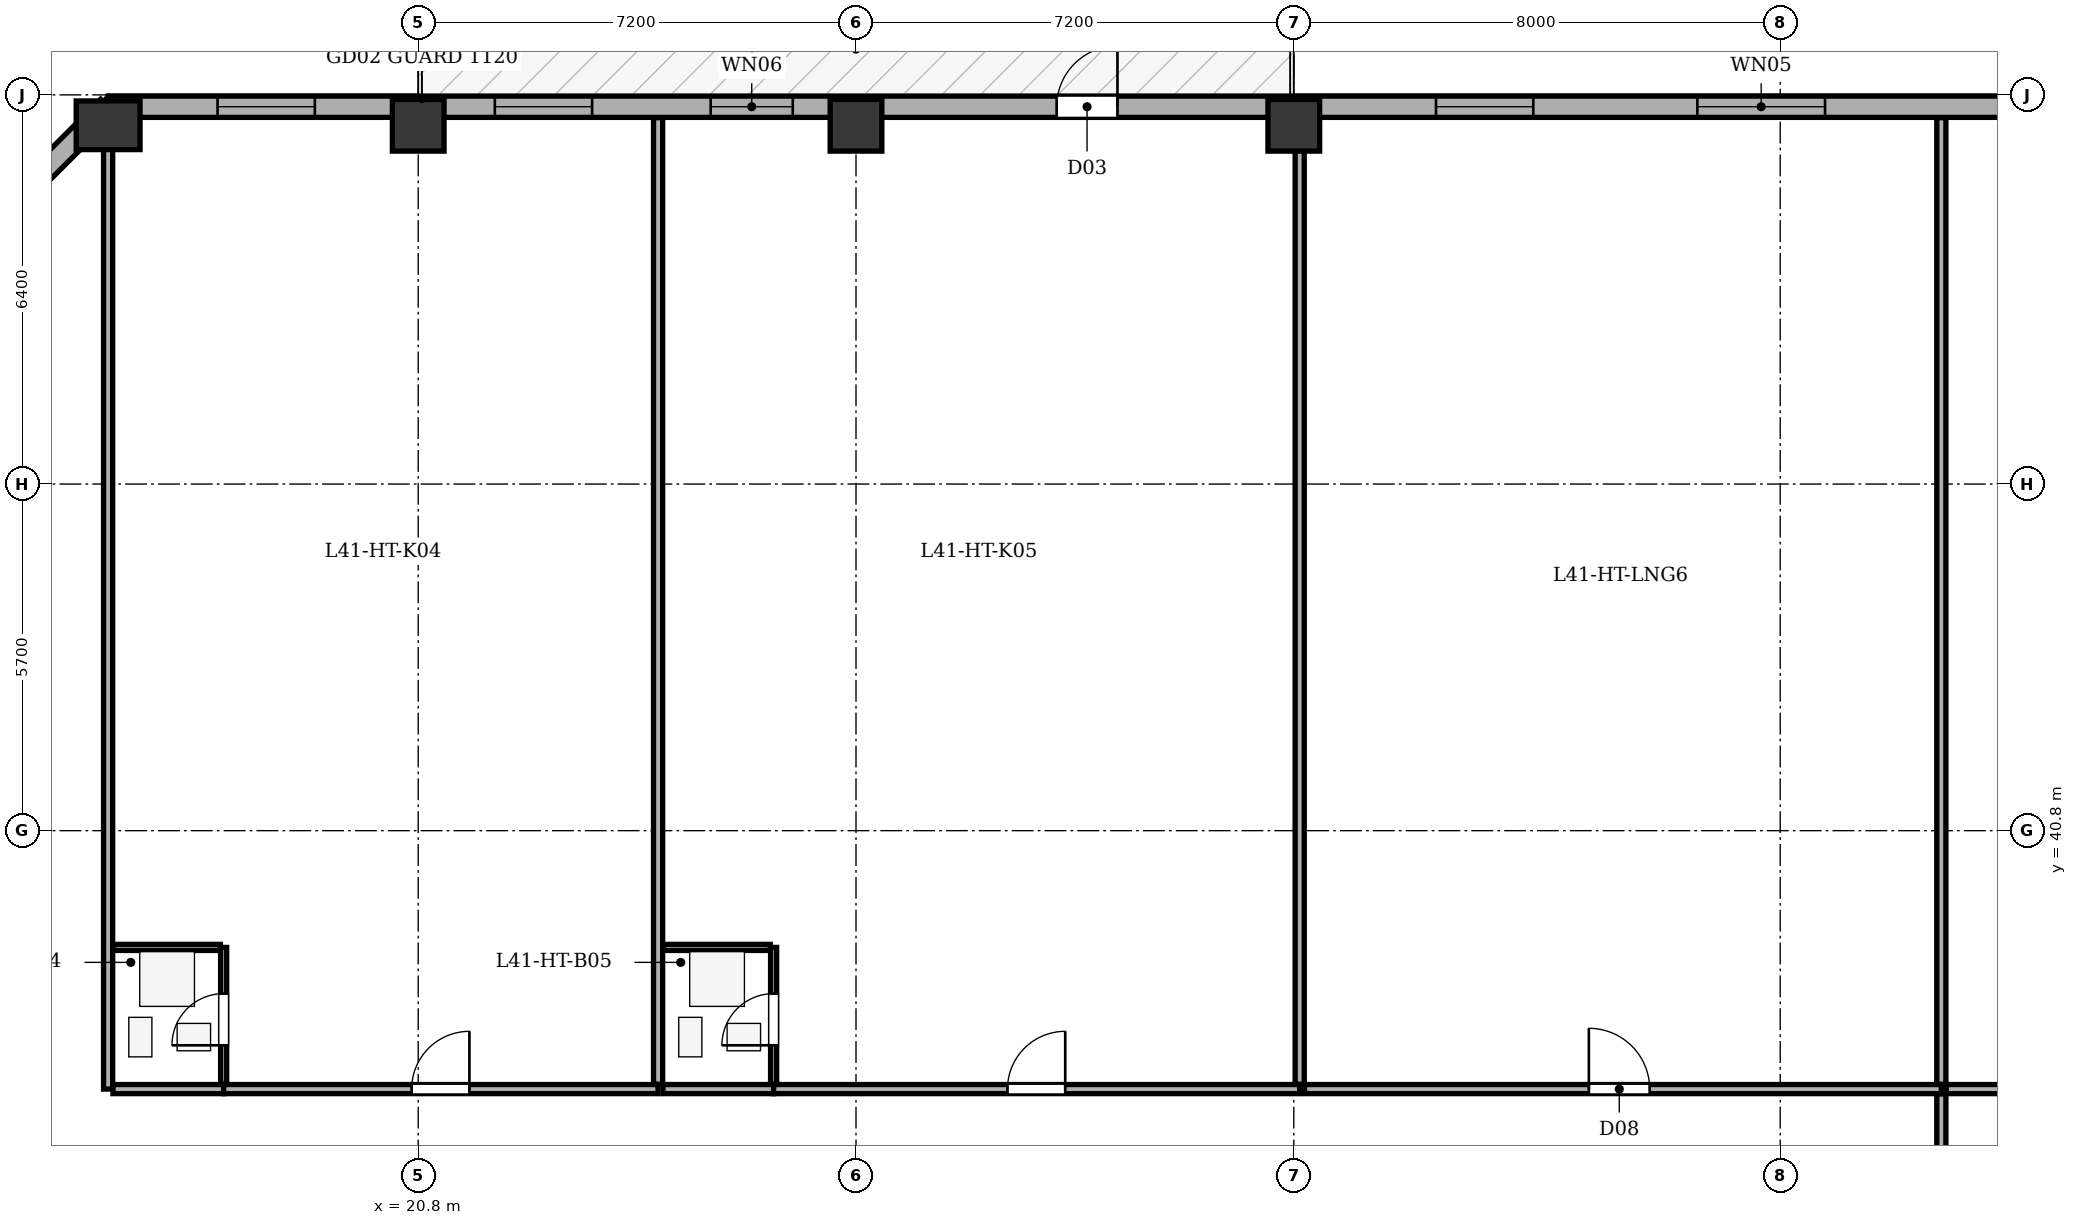
"""IFC4 building model, lengths in metres.
Left out: names, types, materials, properties, quantities, classifications, styles, units other than length and angle.
Written with IfcOpenShell. Run it as: python <this file> out.ifc"""

import sys

from ifc_helpers import new_model, si_unit, direction, frame, frame_2d, origin, origin_2d, place, context, subcontext, project, spatial, rectangle, extrude, element, fill, save


model = new_model("IFC4")
c1 = context("Model", 3, precision=1e-05, world=origin(), true_north=direction((0.0, 1.0)))
c2 = subcontext(c1, "Body", "Model", "MODEL_VIEW")
j1 = project(units=[si_unit("LENGTHUNIT", "METRE"), si_unit("PLANEANGLEUNIT", "RADIAN")], contexts=[c1])
p1 = place(None, origin())
s1 = spatial("IfcSite", under=j1, at=p1, CompositionType="ELEMENT")
p2 = place(p1, origin())
s2 = spatial("IfcBuilding", under=s1, at=p2, CompositionType="ELEMENT")
p3 = place(p2, frame((0.0, 0.0, 162.3)))
s3 = spatial("IfcBuildingStorey", under=s2, at=p3, CompositionType="ELEMENT", Elevation=162.3)
p4 = place(p3, frame((15.7, 52.4, 0.0), z_axis=(0.0, 0.0, 1.0), x_axis=(1.0, 0.0, 0.0)))
e1 = element("IfcColumn", 1, at=p4, inside=s3, PredefinedType="COLUMN", context=c2, shape_type="SweptSolid", body=[
    extrude(rectangle(XDim=0.8, YDim=1.05, at=origin_2d()), origin(), (0.0, 0.0, 1.0), 3.5),
])
for number, where, z_axis, x_axis in (
    (2, (20.8, 52.4, 0.0), (0.0, 0.0, 1.0), (1.0, 0.0, 0.0)),
    (3, (28.0, 52.4, 0.0), (0.0, 0.0, 1.0), (1.0, 0.0, 0.0)),
    (4, (35.2, 52.4, 0.0), (0.0, 0.0, 1.0), (1.0, 0.0, 0.0)),
):
    element("IfcColumn", number, at=place(p3, frame(where, z_axis=z_axis, x_axis=x_axis)), inside=s3, PredefinedType="COLUMN", context=c2, shape_type="SweptSolid", body=[
        extrude(rectangle(XDim=0.85, YDim=0.85, at=origin_2d()), origin(), (0.0, 0.0, 1.0), 3.5),
    ])
p5 = place(p3, frame((10.895, 47.9, 0.0), z_axis=(0.0, 0.0, 1.0), x_axis=(0.707088817216, 0.7071247447, 0.0)))
e5 = element("IfcWall", 5, at=p5, inside=s3, PredefinedType="STANDARD", context=c2, shape_type="SweptSolid", body=[
    extrude(rectangle(XDim=6.795, YDim=0.35, at=frame_2d((3.398, 0.0))), origin(), (0.0, 0.0, 1.0), 2.785),
])
p6 = place(p5, frame((2.698, 0.0, 0.75)))
e6 = element("IfcOpeningElement", 6, at=p6, cuts=e5, PredefinedType="OPENING", context=c2, shape_type="SweptSolid", body=[
    extrude(rectangle(XDim=1.4, YDim=1.65, at=frame_2d((0.7, 0.825))), frame((0.0, 0.185, 0.0), z_axis=(0.0, -1.0, 0.0), x_axis=(1.0, 0.0, 0.0)), (0.0, 0.0, 1.0), 0.37),
])
p7 = place(p3, frame((15.7, 52.705, 0.0), z_axis=(0.0, 0.0, 1.0), x_axis=(1.0, 0.0, 0.0)))
e7 = element("IfcWall", 7, at=p7, inside=s3, PredefinedType="STANDARD", context=c2, shape_type="SweptSolid", body=[
    extrude(rectangle(XDim=35.0, YDim=0.35, at=frame_2d((17.5, 0.0))), origin(), (0.0, 0.0, 1.0), 2.785),
])
p8 = place(p7, frame((15.6, 0.0, 0.0)))
e8 = element("IfcOpeningElement", 8, at=p8, cuts=e7, PredefinedType="OPENING", context=c2, shape_type="SweptSolid", body=[
    extrude(rectangle(XDim=1.0, YDim=2.02, at=frame_2d((0.5, 1.01))), frame((0.0, 0.185, 0.0), z_axis=(0.0, -1.0, 0.0), x_axis=(1.0, 0.0, 0.0)), (0.0, 0.0, 1.0), 0.37),
])
p9 = place(p7, frame((1.8, 0.0, 0.75)))
e9 = element("IfcOpeningElement", 9, at=p9, cuts=e7, PredefinedType="OPENING", context=c2, shape_type="SweptSolid", body=[
    extrude(rectangle(XDim=1.6, YDim=1.75, at=frame_2d((0.8, 0.875))), frame((0.0, 0.185, 0.0), z_axis=(0.0, -1.0, 0.0), x_axis=(1.0, 0.0, 0.0)), (0.0, 0.0, 1.0), 0.37),
])
p10 = place(p7, frame((6.36, 0.0, 0.75)))
e10 = element("IfcOpeningElement", 10, at=p10, cuts=e7, PredefinedType="OPENING", context=c2, shape_type="SweptSolid", body=[
    extrude(rectangle(XDim=1.6, YDim=1.75, at=frame_2d((0.8, 0.875))), frame((0.0, 0.185, 0.0), z_axis=(0.0, -1.0, 0.0), x_axis=(1.0, 0.0, 0.0)), (0.0, 0.0, 1.0), 0.37),
])
p11 = place(p7, frame((9.91, 0.0, 0.75)))
e11 = element("IfcOpeningElement", 11, at=p11, cuts=e7, PredefinedType="OPENING", context=c2, shape_type="SweptSolid", body=[
    extrude(rectangle(XDim=1.35, YDim=1.75, at=frame_2d((0.675, 0.875))), frame((0.0, 0.185, 0.0), z_axis=(0.0, -1.0, 0.0), x_axis=(1.0, 0.0, 0.0)), (0.0, 0.0, 1.0), 0.37),
])
p12 = place(p7, frame((21.839, 0.0, 0.75)))
e12 = element("IfcOpeningElement", 12, at=p12, cuts=e7, PredefinedType="OPENING", context=c2, shape_type="SweptSolid", body=[
    extrude(rectangle(XDim=1.6, YDim=1.75, at=frame_2d((0.8, 0.875))), frame((0.0, 0.185, 0.0), z_axis=(0.0, -1.0, 0.0), x_axis=(1.0, 0.0, 0.0)), (0.0, 0.0, 1.0), 0.37),
])
p13 = place(p7, frame((26.137, 0.0, 0.75)))
e13 = element("IfcOpeningElement", 13, at=p13, cuts=e7, PredefinedType="OPENING", context=c2, shape_type="SweptSolid", body=[
    extrude(rectangle(XDim=2.1, YDim=1.75, at=frame_2d((1.05, 0.875))), frame((0.0, 0.185, 0.0), z_axis=(0.0, -1.0, 0.0), x_axis=(1.0, 0.0, 0.0)), (0.0, 0.0, 1.0), 0.37),
])
p14 = place(p7, frame((31.637, 0.0, 0.75)))
e14 = element("IfcOpeningElement", 14, at=p14, cuts=e7, PredefinedType="OPENING", context=c2, shape_type="SweptSolid", body=[
    extrude(rectangle(XDim=1.6, YDim=1.75, at=frame_2d((0.8, 0.875))), frame((0.0, 0.185, 0.0), z_axis=(0.0, -1.0, 0.0), x_axis=(1.0, 0.0, 0.0)), (0.0, 0.0, 1.0), 0.37),
])
p15 = place(p3, frame((15.7, 36.55, 0.0), z_axis=(0.0, 0.0, 1.0), x_axis=(0.0, 1.0, 0.0)))
e15 = element("IfcWall", 15, at=p15, inside=s3, PredefinedType="PARTITIONING", context=c2, shape_type="SweptSolid", body=[
    extrude(rectangle(XDim=15.975, YDim=0.15, at=frame_2d((7.987, 0.0))), origin(), (0.0, 0.0, 1.0), 3.2),
])
p16 = place(p3, frame((15.78, 36.55, 0.0), z_axis=(0.0, 0.0, 1.0), x_axis=(1.0, 0.0, 0.0)))
e16 = element("IfcWall", 16, at=p16, inside=s3, PredefinedType="PARTITIONING", context=c2, shape_type="SweptSolid", body=[
    extrude(rectangle(XDim=1.82, YDim=0.15, at=frame_2d((0.91, 0.0))), origin(), (0.0, 0.0, 1.0), 3.2),
])
p17 = place(p3, frame((17.6, 36.55, 0.0), z_axis=(0.0, 0.0, 1.0), x_axis=(1.0, 0.0, 0.0)))
e17 = element("IfcWall", 17, at=p17, inside=s3, PredefinedType="PARTITIONING", context=c2, shape_type="SweptSolid", body=[
    extrude(rectangle(XDim=7.145, YDim=0.15, at=frame_2d((3.573, 0.0))), origin(), (0.0, 0.0, 1.0), 3.2),
])
p18 = place(p17, frame((3.092, 0.0, 0.0)))
e18 = element("IfcOpeningElement", 18, at=p18, cuts=e17, PredefinedType="OPENING", context=c2, shape_type="SweptSolid", body=[
    extrude(rectangle(XDim=0.95, YDim=2.1, at=frame_2d((0.475, 1.05))), frame((0.0, 0.085, 0.0), z_axis=(0.0, -1.0, 0.0), x_axis=(1.0, 0.0, 0.0)), (0.0, 0.0, 1.0), 0.17),
])
p19 = place(p3, frame((17.6, 36.63, 0.0), z_axis=(0.0, 0.0, 1.0), x_axis=(0.0, 1.0, 0.0)))
e19 = element("IfcWall", 19, at=p19, inside=s3, PredefinedType="PARTITIONING", context=c2, shape_type="SweptSolid", body=[
    extrude(rectangle(XDim=2.25, YDim=0.1, at=frame_2d((1.125, 0.0))), origin(), (0.0, 0.0, 1.0), 3.2),
])
p20 = place(p19, frame((0.64, 0.0, 0.0)))
e20 = element("IfcOpeningElement", 20, at=p20, cuts=e19, PredefinedType="OPENING", context=c2, shape_type="SweptSolid", body=[
    extrude(rectangle(XDim=0.85, YDim=2.05, at=frame_2d((0.425, 1.025))), frame((0.0, 0.06, 0.0), z_axis=(0.0, -1.0, 0.0), x_axis=(1.0, 0.0, 0.0)), (0.0, 0.0, 1.0), 0.12),
])
p21 = place(p3, frame((15.78, 38.88, 0.0), z_axis=(0.0, 0.0, 1.0), x_axis=(1.0, 0.0, 0.0)))
e21 = element("IfcWall", 21, at=p21, inside=s3, PredefinedType="PARTITIONING", context=c2, shape_type="SweptSolid", body=[
    extrude(rectangle(XDim=1.765, YDim=0.1, at=frame_2d((0.882, 0.0))), origin(), (0.0, 0.0, 1.0), 3.2),
])
p22 = place(p3, frame((24.745, 36.63, 0.0), z_axis=(0.0, 0.0, 1.0), x_axis=(0.0, 1.0, 0.0)))
e22 = element("IfcWall", 22, at=p22, inside=s3, PredefinedType="PARTITIONING", context=c2, shape_type="SweptSolid", body=[
    extrude(rectangle(XDim=15.895, YDim=0.15, at=frame_2d((7.948, 0.0))), origin(), (0.0, 0.0, 1.0), 3.2),
])
p23 = place(p3, frame((24.825, 36.55, 0.0), z_axis=(0.0, 0.0, 1.0), x_axis=(1.0, 0.0, 0.0)))
e23 = element("IfcWall", 23, at=p23, inside=s3, PredefinedType="PARTITIONING", context=c2, shape_type="SweptSolid", body=[
    extrude(rectangle(XDim=1.82, YDim=0.15, at=frame_2d((0.91, 0.0))), origin(), (0.0, 0.0, 1.0), 3.2),
])
p24 = place(p3, frame((26.645, 36.55, 0.0), z_axis=(0.0, 0.0, 1.0), x_axis=(1.0, 0.0, 0.0)))
e24 = element("IfcWall", 24, at=p24, inside=s3, PredefinedType="PARTITIONING", context=c2, shape_type="SweptSolid", body=[
    extrude(rectangle(XDim=8.652, YDim=0.15, at=frame_2d((4.326, 0.0))), origin(), (0.0, 0.0, 1.0), 3.2),
])
p25 = place(p24, frame((3.846, 0.0, 0.0)))
e25 = element("IfcOpeningElement", 25, at=p25, cuts=e24, PredefinedType="OPENING", context=c2, shape_type="SweptSolid", body=[
    extrude(rectangle(XDim=0.95, YDim=2.1, at=frame_2d((0.475, 1.05))), frame((0.0, 0.085, 0.0), z_axis=(0.0, -1.0, 0.0), x_axis=(1.0, 0.0, 0.0)), (0.0, 0.0, 1.0), 0.17),
])
p26 = place(p3, frame((26.645, 36.63, 0.0), z_axis=(0.0, 0.0, 1.0), x_axis=(0.0, 1.0, 0.0)))
e26 = element("IfcWall", 26, at=p26, inside=s3, PredefinedType="PARTITIONING", context=c2, shape_type="SweptSolid", body=[
    extrude(rectangle(XDim=2.25, YDim=0.1, at=frame_2d((1.125, 0.0))), origin(), (0.0, 0.0, 1.0), 3.2),
])
p27 = place(p26, frame((0.64, 0.0, 0.0)))
e27 = element("IfcOpeningElement", 27, at=p27, cuts=e26, PredefinedType="OPENING", context=c2, shape_type="SweptSolid", body=[
    extrude(rectangle(XDim=0.85, YDim=2.05, at=frame_2d((0.425, 1.025))), frame((0.0, 0.06, 0.0), z_axis=(0.0, -1.0, 0.0), x_axis=(1.0, 0.0, 0.0)), (0.0, 0.0, 1.0), 0.12),
])
p28 = place(p3, frame((24.825, 38.88, 0.0), z_axis=(0.0, 0.0, 1.0), x_axis=(1.0, 0.0, 0.0)))
e28 = element("IfcWall", 28, at=p28, inside=s3, PredefinedType="PARTITIONING", context=c2, shape_type="SweptSolid", body=[
    extrude(rectangle(XDim=1.765, YDim=0.1, at=frame_2d((0.883, 0.0))), origin(), (0.0, 0.0, 1.0), 3.2),
])
p29 = place(p3, frame((35.297, 36.63, 0.0), z_axis=(0.0, 0.0, 1.0), x_axis=(0.0, 1.0, 0.0)))
e29 = element("IfcWall", 29, at=p29, inside=s3, PredefinedType="PARTITIONING", context=c2, shape_type="SweptSolid", body=[
    extrude(rectangle(XDim=15.895, YDim=0.15, at=frame_2d((7.948, 0.0))), origin(), (0.0, 0.0, 1.0), 2.535),
])
p30 = place(p3, frame((35.377, 36.55, 0.0), z_axis=(0.0, 0.0, 1.0), x_axis=(1.0, 0.0, 0.0)))
e30 = element("IfcWall", 30, at=p30, inside=s3, PredefinedType="PARTITIONING", context=c2, shape_type="SweptSolid", body=[
    extrude(rectangle(XDim=10.473, YDim=0.15, at=frame_2d((5.237, 0.0))), origin(), (0.0, 0.0, 1.0), 3.2),
])
p31 = place(p30, frame((4.676, 0.0, 0.0)))
e31 = element("IfcOpeningElement", 31, at=p31, cuts=e30, PredefinedType="OPENING", context=c2, shape_type="SweptSolid", body=[
    extrude(rectangle(XDim=1.0, YDim=2.1, at=frame_2d((0.5, 1.05))), frame((0.0, 0.085, 0.0), z_axis=(0.0, -1.0, 0.0), x_axis=(1.0, 0.0, 0.0)), (0.0, 0.0, 1.0), 0.17),
])
p32 = place(p3, frame((45.85, 36.63, 0.0), z_axis=(0.0, 0.0, 1.0), x_axis=(0.0, 1.0, 0.0)))
e32 = element("IfcWall", 32, at=p32, inside=s3, PredefinedType="PARTITIONING", context=c2, shape_type="SweptSolid", body=[
    extrude(rectangle(XDim=15.895, YDim=0.15, at=frame_2d((7.948, 0.0))), origin(), (0.0, 0.0, 1.0), 3.2),
])
p33 = place(p3, frame((45.93, 36.55, 0.0), z_axis=(0.0, 0.0, 1.0), x_axis=(1.0, 0.0, 0.0)))
e33 = element("IfcWall", 33, at=p33, inside=s3, PredefinedType="PARTITIONING", context=c2, shape_type="SweptSolid", body=[
    extrude(rectangle(XDim=9.395, YDim=0.15, at=frame_2d((4.698, 0.0))), origin(), (0.0, 0.0, 1.0), 3.2),
])
p34 = place(p3, frame((45.85, 17.93, 0.0), z_axis=(0.0, 0.0, 1.0), x_axis=(0.0, 1.0, 0.0)))
e34 = element("IfcWall", 34, at=p34, inside=s3, PredefinedType="PARTITIONING", context=c2, shape_type="SweptSolid", body=[
    extrude(rectangle(XDim=18.54, YDim=0.15, at=frame_2d((9.27, 0.0))), origin(), (0.0, 0.0, 1.0), 3.2),
])
p35 = place(p34, frame((8.79, 0.0, 0.0)))
e35 = element("IfcOpeningElement", 35, at=p35, cuts=e34, PredefinedType="OPENING", context=c2, shape_type="SweptSolid", body=[
    extrude(rectangle(XDim=0.95, YDim=2.1, at=frame_2d((0.475, 1.05))), frame((0.0, 0.085, 0.0), z_axis=(0.0, -1.0, 0.0), x_axis=(1.0, 0.0, 0.0)), (0.0, 0.0, 1.0), 0.17),
])
p36 = place(p8, origin())
e36 = element("IfcDoor", 36, at=p36, inside=s3, OperationType="SINGLE_SWING_RIGHT", PredefinedType="DOOR", context=c2, shape_type="SweptSolid", body=[
    extrude(rectangle(XDim=1.0, YDim=2.02, at=frame_2d((0.5, 1.01))), frame((0.0, 0.025, 0.0), z_axis=(0.0, -1.0, 0.0), x_axis=(1.0, 0.0, 0.0)), (0.0, 0.0, 1.0), 0.05),
])
fill(e8, e36)
p37 = place(p9, origin())
e37 = element("IfcWindow", 37, at=p37, inside=s3, PartitioningType="SINGLE_PANEL", PredefinedType="WINDOW", context=c2, shape_type="SweptSolid", body=[
    extrude(rectangle(XDim=1.6, YDim=1.75, at=frame_2d((0.8, 0.875))), frame((0.0, -0.01, 0.0), z_axis=(0.0, -1.0, 0.0), x_axis=(1.0, 0.0, 0.0)), (0.0, 0.0, 1.0), 0.06),
])
fill(e9, e37)
p38 = place(p10, origin())
e38 = element("IfcWindow", 38, at=p38, inside=s3, PartitioningType="SINGLE_PANEL", PredefinedType="WINDOW", context=c2, shape_type="SweptSolid", body=[
    extrude(rectangle(XDim=1.6, YDim=1.75, at=frame_2d((0.8, 0.875))), frame((0.0, -0.01, 0.0), z_axis=(0.0, -1.0, 0.0), x_axis=(1.0, 0.0, 0.0)), (0.0, 0.0, 1.0), 0.06),
])
fill(e10, e38)
p39 = place(p11, origin())
e39 = element("IfcWindow", 39, at=p39, inside=s3, PartitioningType="SINGLE_PANEL", PredefinedType="WINDOW", context=c2, shape_type="SweptSolid", body=[
    extrude(rectangle(XDim=1.35, YDim=1.75, at=frame_2d((0.675, 0.875))), frame((0.0, -0.01, 0.0), z_axis=(0.0, -1.0, 0.0), x_axis=(1.0, 0.0, 0.0)), (0.0, 0.0, 1.0), 0.06),
])
fill(e11, e39)
p40 = place(p12, origin())
e40 = element("IfcWindow", 40, at=p40, inside=s3, PartitioningType="SINGLE_PANEL", PredefinedType="WINDOW", context=c2, shape_type="SweptSolid", body=[
    extrude(rectangle(XDim=1.6, YDim=1.75, at=frame_2d((0.8, 0.875))), frame((0.0, -0.01, 0.0), z_axis=(0.0, -1.0, 0.0), x_axis=(1.0, 0.0, 0.0)), (0.0, 0.0, 1.0), 0.06),
])
fill(e12, e40)
p41 = place(p13, origin())
e41 = element("IfcWindow", 41, at=p41, inside=s3, PartitioningType="SINGLE_PANEL", PredefinedType="WINDOW", context=c2, shape_type="SweptSolid", body=[
    extrude(rectangle(XDim=2.1, YDim=1.75, at=frame_2d((1.05, 0.875))), frame((0.0, -0.01, 0.0), z_axis=(0.0, -1.0, 0.0), x_axis=(1.0, 0.0, 0.0)), (0.0, 0.0, 1.0), 0.06),
])
fill(e13, e41)
p42 = place(p20, origin())
e42 = element("IfcDoor", 42, at=p42, inside=s3, OperationType="SINGLE_SWING_LEFT", PredefinedType="DOOR", context=c2, shape_type="SweptSolid", body=[
    extrude(rectangle(XDim=0.85, YDim=2.05, at=frame_2d((0.425, 1.025))), frame((0.0, 0.025, 0.0), z_axis=(0.0, -1.0, 0.0), x_axis=(1.0, 0.0, 0.0)), (0.0, 0.0, 1.0), 0.05),
])
fill(e20, e42)
p43 = place(p18, origin())
e43 = element("IfcDoor", 43, at=p43, inside=s3, OperationType="SINGLE_SWING_RIGHT", PredefinedType="DOOR", context=c2, shape_type="SweptSolid", body=[
    extrude(rectangle(XDim=0.95, YDim=2.1, at=frame_2d((0.475, 1.05))), frame((0.0, 0.025, 0.0), z_axis=(0.0, -1.0, 0.0), x_axis=(1.0, 0.0, 0.0)), (0.0, 0.0, 1.0), 0.05),
])
fill(e18, e43)
p44 = place(p27, origin())
e44 = element("IfcDoor", 44, at=p44, inside=s3, OperationType="SINGLE_SWING_LEFT", PredefinedType="DOOR", context=c2, shape_type="SweptSolid", body=[
    extrude(rectangle(XDim=0.85, YDim=2.05, at=frame_2d((0.425, 1.025))), frame((0.0, 0.025, 0.0), z_axis=(0.0, -1.0, 0.0), x_axis=(1.0, 0.0, 0.0)), (0.0, 0.0, 1.0), 0.05),
])
fill(e27, e44)
p45 = place(p25, origin())
e45 = element("IfcDoor", 45, at=p45, inside=s3, OperationType="SINGLE_SWING_RIGHT", PredefinedType="DOOR", context=c2, shape_type="SweptSolid", body=[
    extrude(rectangle(XDim=0.95, YDim=2.1, at=frame_2d((0.475, 1.05))), frame((0.0, 0.025, 0.0), z_axis=(0.0, -1.0, 0.0), x_axis=(1.0, 0.0, 0.0)), (0.0, 0.0, 1.0), 0.05),
])
fill(e25, e45)
p46 = place(p31, origin())
e46 = element("IfcDoor", 46, at=p46, inside=s3, OperationType="SINGLE_SWING_LEFT", PredefinedType="DOOR", context=c2, shape_type="SweptSolid", body=[
    extrude(rectangle(XDim=1.0, YDim=2.1, at=frame_2d((0.5, 1.05))), frame((0.0, 0.025, 0.0), z_axis=(0.0, -1.0, 0.0), x_axis=(1.0, 0.0, 0.0)), (0.0, 0.0, 1.0), 0.05),
])
fill(e31, e46)
save(model, sys.argv[1])
